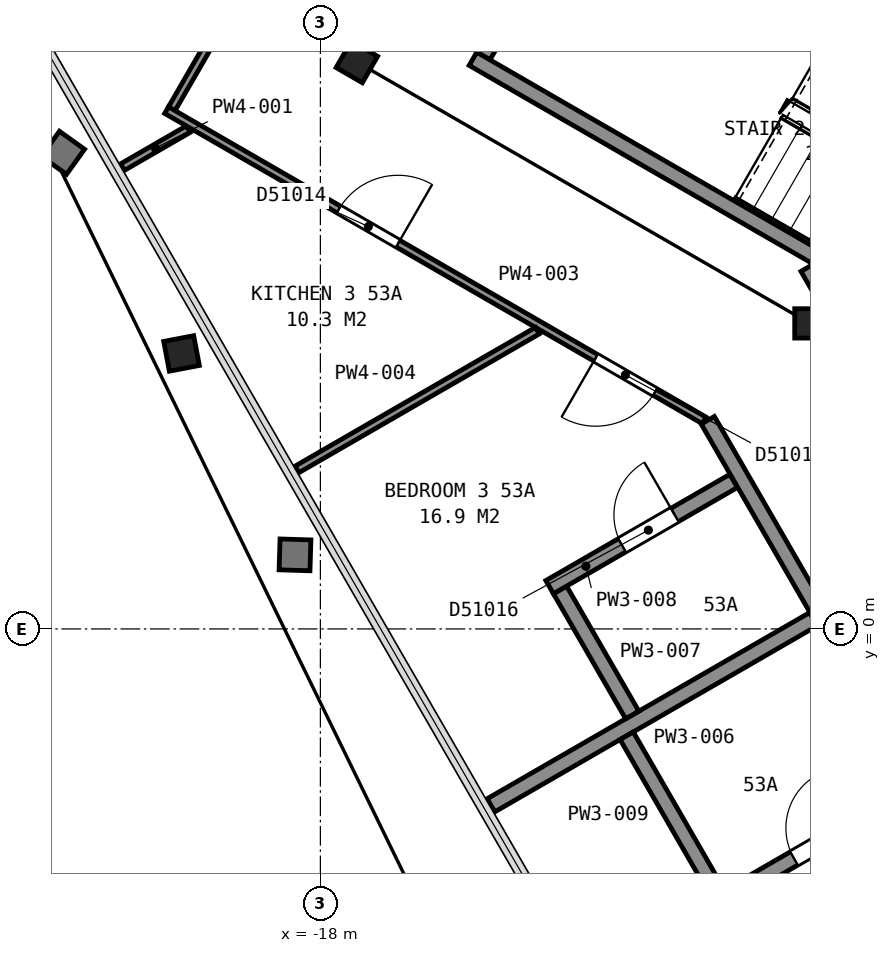
"""IFC4 building model, lengths in metres.
Left out: names, types, materials, properties, quantities, classifications, styles, units other than length and angle.
Written with IfcOpenShell. Run it as: python <this file> out.ifc"""

import sys

from ifc_helpers import new_model, si_unit, direction, frame, frame_2d, origin, origin_2d, place, context, subcontext, project, spatial, rectangle, i_section, extrude, element, fill, save


model = new_model("IFC4")
c1 = context("Model", 3, precision=1e-05, world=origin(), true_north=direction((0.0, 1.0)))
c2 = subcontext(c1, "Body", "Model", "MODEL_VIEW")
j1 = project(units=[si_unit("LENGTHUNIT", "METRE"), si_unit("PLANEANGLEUNIT", "RADIAN")], contexts=[c1])
p1 = place(None, origin())
s1 = spatial("IfcSite", under=j1, at=p1, CompositionType="ELEMENT")
p2 = place(p1, origin())
s2 = spatial("IfcBuilding", under=s1, at=p2, CompositionType="ELEMENT")
p3 = place(p2, frame((0.0, 0.0, 213.8)))
s3 = spatial("IfcBuildingStorey", under=s2, at=p3, CompositionType="ELEMENT", Elevation=213.8)
p4 = place(p3, frame((-19.598, 3.668, 0.04), z_axis=(-0.19341182923, -0.037095396991, 0.980416134015), x_axis=(-0.498932099925, 0.864144788984, -0.065730840066)))
e1 = element("IfcColumn", 1, at=p4, inside=s3, PredefinedType="COLUMN", context=c2, shape_type="SweptSolid", body=[
    extrude(i_section(OverallWidth=0.401, OverallDepth=0.399, WebThickness=0.025, FlangeThickness=0.04, FilletRadius=0.015, at=origin_2d()), origin(), (0.0, 0.0, 1.0), 3.692),
])
p5 = place(p3, frame((-17.52, 7.46, 0.0), z_axis=(0.0, 0.0, 1.0), x_axis=(0.5, 0.866025403784, 0.0)))
e2 = element("IfcColumn", 2, at=p5, inside=s3, PredefinedType="COLUMN", context=c2, shape_type="SweptSolid", body=[
    extrude(i_section(OverallWidth=0.401, OverallDepth=0.399, WebThickness=0.025, FlangeThickness=0.04, FilletRadius=0.015, at=origin_2d()), origin(), (0.0, 0.0, 1.0), 3.7),
])
p6 = place(p3, frame((-11.56, 4.02, 0.0), z_axis=(0.0, 0.0, 1.0), x_axis=(1.0, 0.0, 0.0)))
e3 = element("IfcColumn", 3, at=p6, inside=s3, PredefinedType="COLUMN", context=c2, shape_type="SweptSolid", body=[
    extrude(i_section(OverallWidth=0.399, OverallDepth=0.386, WebThickness=0.021, FlangeThickness=0.033, FilletRadius=0.015, at=origin_2d()), origin(), (0.0, 0.0, 1.0), 3.7),
])
p7 = place(p3, frame((-14.455, 9.962, 0.0), z_axis=(0.0, 0.0, 1.0), x_axis=(-0.500049511043, -0.865996816683, 0.0)))
e4 = element("IfcWall", 4, at=p7, inside=s3, PredefinedType="PARTITIONING", context=c2, shape_type="SweptSolid", body=[
    extrude(rectangle(XDim=2.8, YDim=0.2, at=frame_2d((1.4, 0.0))), origin(), (0.0, 0.0, 1.0), 3.45),
])
p8 = place(p7, frame((0.85, 0.0, 0.0)))
e5 = element("IfcOpeningElement", 5, at=p8, cuts=e4, PredefinedType="OPENING", context=c2, shape_type="SweptSolid", body=[
    extrude(rectangle(XDim=1.1, YDim=2.1, at=frame_2d((0.55, 1.05))), frame((0.0, 0.11, 0.0), z_axis=(0.0, -1.0, 0.0), x_axis=(1.0, 0.0, 0.0)), (0.0, 0.0, 1.0), 0.22),
])
for number, where, z_axis, x_axis in (
    (6, (-7.678, 2.701, 0.0), (0.0, 0.0, 1.0), (-0.866, 0.5, 0.0)),
    (7, (-6.178, 5.299, 0.0), (0.0, 0.0, 1.0), (-0.866, 0.5, 0.0)),
):
    element("IfcWall", number, at=place(p3, frame(where, z_axis=z_axis, x_axis=x_axis)), inside=s3, PredefinedType="PARTITIONING", context=c2, shape_type="SweptSolid", body=[
        extrude(rectangle(XDim=9.6, YDim=0.2, at=frame_2d((4.8, 0.0))), origin(), (0.0, 0.0, 1.0), 3.45),
    ])
p9 = place(p3, frame((-11.591, 4.755, 0.0), z_axis=(0.0, 0.0, 1.0), x_axis=(0.500043977787, -0.866000011708, 0.0)))
e8 = element("IfcWall", 8, at=p9, inside=s3, PredefinedType="PARTITIONING", context=c2, shape_type="SweptSolid", body=[
    extrude(rectangle(XDim=6.617, YDim=0.2, at=frame_2d((3.308, 0.0))), origin(), (0.0, 0.0, 1.0), 3.45),
])
p10 = place(p9, frame((3.695, 0.0, 0.0)))
e9 = element("IfcOpeningElement", 9, at=p10, cuts=e8, PredefinedType="OPENING", context=c2, shape_type="SweptSolid", body=[
    extrude(rectangle(XDim=1.8, YDim=2.1, at=frame_2d((0.9, 1.05))), frame((0.0, 0.11, 0.0), z_axis=(0.0, -1.0, 0.0), x_axis=(1.0, 0.0, 0.0)), (0.0, 0.0, 1.0), 0.22),
])
p11 = place(p3, frame((-20.604, 6.076, 0.0), z_axis=(0.0, 0.0, 1.0), x_axis=(0.865855657918, 0.500293893279, 0.0)))
e10 = element("IfcWall", 10, at=p11, inside=s3, PredefinedType="PARTITIONING", context=c2, shape_type="SweptSolid", body=[
    extrude(rectangle(XDim=0.999, YDim=0.1, at=frame_2d((0.499, 0.0))), origin(), (0.0, 0.0, 1.0), 2.713),
])
p12 = place(p3, frame((-19.955, 6.844, 0.0), z_axis=(0.0, 0.0, 1.0), x_axis=(0.500415732313, 0.865785247537, 0.0)))
e11 = element("IfcWall", 11, at=p12, inside=s3, PredefinedType="PARTITIONING", context=c2, shape_type="SweptSolid", body=[
    extrude(rectangle(XDim=8.097, YDim=0.1, at=frame_2d((4.049, 0.0))), origin(), (0.0, 0.0, 1.0), 2.713),
])
p13 = place(p12, frame((3.6, 0.0, 0.0)))
e12 = element("IfcOpeningElement", 12, at=p13, cuts=e11, PredefinedType="OPENING", context=c2, shape_type="SweptSolid", body=[
    extrude(rectangle(XDim=0.9, YDim=2.1, at=frame_2d((0.45, 1.05))), frame((0.0, 0.06, 0.0), z_axis=(0.0, -1.0, 0.0), x_axis=(1.0, 0.0, 0.0)), (0.0, 0.0, 1.0), 0.12),
])
p14 = place(p3, frame((-12.952, 2.744, 0.0), z_axis=(0.0, 0.0, 1.0), x_axis=(-0.86608949446, 0.499888975259, 0.0)))
e13 = element("IfcWall", 13, at=p14, inside=s3, PredefinedType="PARTITIONING", context=c2, shape_type="SweptSolid", body=[
    extrude(rectangle(XDim=8.165, YDim=0.1, at=frame_2d((4.083, 0.0))), origin(), (0.0, 0.0, 1.0), 2.713),
])
p15 = place(p14, frame((4.65, 0.0, 0.0)))
e14 = element("IfcOpeningElement", 14, at=p15, cuts=e13, PredefinedType="OPENING", context=c2, shape_type="SweptSolid", body=[
    extrude(rectangle(XDim=0.9, YDim=2.1, at=frame_2d((0.45, 1.05))), frame((0.0, 0.06, 0.0), z_axis=(0.0, -1.0, 0.0), x_axis=(1.0, 0.0, 0.0)), (0.0, 0.0, 1.0), 0.12),
])
p16 = place(p14, frame((0.746, 0.0, 0.0)))
e15 = element("IfcOpeningElement", 15, at=p16, cuts=e13, PredefinedType="OPENING", context=c2, shape_type="SweptSolid", body=[
    extrude(rectangle(XDim=0.9, YDim=2.1, at=frame_2d((0.45, 1.05))), frame((0.0, 0.06, 0.0), z_axis=(0.0, -1.0, 0.0), x_axis=(1.0, 0.0, 0.0)), (0.0, 0.0, 1.0), 0.12),
])
p17 = place(p3, frame((-18.308, 2.099, 0.0), z_axis=(0.0, 0.0, 1.0), x_axis=(0.866054218355, 0.499950088379, 0.0)))
e16 = element("IfcWall", 16, at=p17, inside=s3, PredefinedType="PARTITIONING", context=c2, shape_type="SweptSolid", body=[
    extrude(rectangle(XDim=3.652, YDim=0.1, at=frame_2d((1.826, 0.0))), origin(), (0.0, 0.0, 1.0), 2.713),
])
p18 = place(p3, frame((-15.756, -2.321, 0.0), z_axis=(0.0, 0.0, 1.0), x_axis=(0.866042025588, 0.499971209087, 0.0)))
e17 = element("IfcWall", 17, at=p18, inside=s3, PredefinedType="PARTITIONING", context=c2, shape_type="SweptSolid", body=[
    extrude(rectangle(XDim=4.899, YDim=0.2, at=frame_2d((2.45, 0.0))), origin(), (0.0, 0.0, 1.0), 2.713),
])
p19 = place(p3, frame((-14.847, 0.513, 0.0), z_axis=(0.0, 0.0, 1.0), x_axis=(0.499911523785, -0.866076479525, 0.0)))
e18 = element("IfcWall", 18, at=p19, inside=s3, PredefinedType="PARTITIONING", context=c2, shape_type="SweptSolid", body=[
    extrude(rectangle(XDim=1.9, YDim=0.2, at=frame_2d((0.95, 0.0))), origin(), (0.0, 0.0, 1.0), 2.713),
])
p20 = place(p3, frame((-12.563, 1.948, 0.0), z_axis=(0.0, 0.0, 1.0), x_axis=(-0.866041588165, -0.499971966783, 0.0)))
e19 = element("IfcWall", 19, at=p20, inside=s3, PredefinedType="PARTITIONING", context=c2, shape_type="SweptSolid", body=[
    extrude(rectangle(XDim=2.795, YDim=0.2, at=frame_2d((1.397, 0.0))), origin(), (0.0, 0.0, 1.0), 2.713),
])
p21 = place(p20, frame((0.895, 0.0, 0.0)))
e20 = element("IfcOpeningElement", 20, at=p21, cuts=e19, PredefinedType="OPENING", context=c2, shape_type="SweptSolid", body=[
    extrude(rectangle(XDim=0.8, YDim=2.1, at=frame_2d((0.4, 1.05))), frame((0.0, 0.11, 0.0), z_axis=(0.0, -1.0, 0.0), x_axis=(1.0, 0.0, 0.0)), (0.0, 0.0, 1.0), 0.22),
])
p22 = place(p3, frame((-13.97, -1.406, 0.0), z_axis=(0.0, 0.0, 1.0), x_axis=(0.499784123135, -0.866150004481, 0.0)))
e21 = element("IfcWall", 21, at=p22, inside=s3, PredefinedType="PARTITIONING", context=c2, shape_type="SweptSolid", body=[
    extrude(rectangle(XDim=2.399, YDim=0.2, at=frame_2d((1.199, 0.0))), origin(), (0.0, 0.0, 1.0), 2.713),
])
p23 = place(p3, frame((-4.075, -12.545, 0.0), z_axis=(0.0, 0.0, 1.0), x_axis=(-0.499999743747, 0.866025551732, 0.0)))
e22 = element("IfcWall", 22, at=p23, inside=s3, PredefinedType="PARTITIONING", context=c2, shape_type="SweptSolid", body=[
    extrude(rectangle(XDim=17.656, YDim=0.2, at=frame_2d((8.828, 0.0))), origin(), (0.0, 0.0, 1.0), 2.713),
])
p24 = place(p23, frame((9.895, 0.0, 0.0)))
e23 = element("IfcOpeningElement", 23, at=p24, cuts=e22, PredefinedType="OPENING", context=c2, shape_type="SweptSolid", body=[
    extrude(rectangle(XDim=0.9, YDim=2.1, at=frame_2d((0.45, 1.05))), frame((0.0, 0.11, 0.0), z_axis=(0.0, -1.0, 0.0), x_axis=(1.0, 0.0, 0.0)), (0.0, 0.0, 1.0), 0.22),
])
p25 = place(p23, frame((6.622, 0.0, 0.0)))
e24 = element("IfcOpeningElement", 24, at=p25, cuts=e22, PredefinedType="OPENING", context=c2, shape_type="SweptSolid", body=[
    extrude(rectangle(XDim=0.9, YDim=2.1, at=frame_2d((0.45, 1.05))), frame((0.0, 0.11, 0.0), z_axis=(0.0, -1.0, 0.0), x_axis=(1.0, 0.0, 0.0)), (0.0, 0.0, 1.0), 0.22),
])
p26 = place(p23, frame((0.268, 0.0, 0.0)))
e25 = element("IfcOpeningElement", 25, at=p26, cuts=e22, PredefinedType="OPENING", context=c2, shape_type="SweptSolid", body=[
    extrude(rectangle(XDim=0.9, YDim=2.1, at=frame_2d((0.45, 1.05))), frame((0.0, 0.11, 0.0), z_axis=(0.0, -1.0, 0.0), x_axis=(1.0, 0.0, 0.0)), (0.0, 0.0, 1.0), 0.22),
])
p27 = place(p3, frame((-12.808, -3.62, 0.0), z_axis=(0.0, 0.0, 1.0), x_axis=(0.866134024916, 0.499811815469, 0.0)))
e26 = element("IfcWall", 26, at=p27, inside=s3, PredefinedType="PARTITIONING", context=c2, shape_type="SweptSolid", body=[
    extrude(rectangle(XDim=2.996, YDim=0.2, at=frame_2d((1.498, 0.0))), origin(), (0.0, 0.0, 1.0), 2.713),
])
p28 = place(p27, frame((1.2, 0.0, 0.0)))
e27 = element("IfcOpeningElement", 27, at=p28, cuts=e26, PredefinedType="OPENING", context=c2, shape_type="SweptSolid", body=[
    extrude(rectangle(XDim=0.8, YDim=2.1, at=frame_2d((0.4, 1.05))), frame((0.0, 0.11, 0.0), z_axis=(0.0, -1.0, 0.0), x_axis=(1.0, 0.0, 0.0)), (0.0, 0.0, 1.0), 0.22),
])
p29 = place(p15, origin())
e28 = element("IfcDoor", 28, at=p29, inside=s3, OperationType="SINGLE_SWING_LEFT", PredefinedType="DOOR", context=c2, shape_type="SweptSolid", body=[
    extrude(rectangle(XDim=0.9, YDim=2.1, at=frame_2d((0.45, 1.05))), frame((0.0, 0.025, 0.0), z_axis=(0.0, -1.0, 0.0), x_axis=(1.0, 0.0, 0.0)), (0.0, 0.0, 1.0), 0.05),
])
fill(e14, e28)
p30 = place(p16, origin())
e29 = element("IfcDoor", 29, at=p30, inside=s3, OperationType="SINGLE_SWING_RIGHT", PredefinedType="DOOR", context=c2, shape_type="SweptSolid", body=[
    extrude(rectangle(XDim=0.9, YDim=2.1, at=frame_2d((0.45, 1.05))), frame((0.0, 0.025, 0.0), z_axis=(0.0, -1.0, 0.0), x_axis=(1.0, 0.0, 0.0)), (0.0, 0.0, 1.0), 0.05),
])
fill(e15, e29)
p31 = place(p21, origin())
e30 = element("IfcDoor", 30, at=p31, inside=s3, OperationType="SINGLE_SWING_LEFT", PredefinedType="DOOR", context=c2, shape_type="SweptSolid", body=[
    extrude(rectangle(XDim=0.8, YDim=2.1, at=frame_2d((0.4, 1.05))), frame((0.0, 0.025, 0.0), z_axis=(0.0, -1.0, 0.0), x_axis=(1.0, 0.0, 0.0)), (0.0, 0.0, 1.0), 0.05),
])
fill(e20, e30)
p32 = place(p28, origin())
e31 = element("IfcDoor", 31, at=p32, inside=s3, OperationType="SINGLE_SWING_RIGHT", PredefinedType="DOOR", context=c2, shape_type="SweptSolid", body=[
    extrude(rectangle(XDim=0.8, YDim=2.1, at=frame_2d((0.4, 1.05))), frame((0.0, 0.025, 0.0), z_axis=(0.0, -1.0, 0.0), x_axis=(1.0, 0.0, 0.0)), (0.0, 0.0, 1.0), 0.05),
])
fill(e27, e31)
save(model, sys.argv[1])
